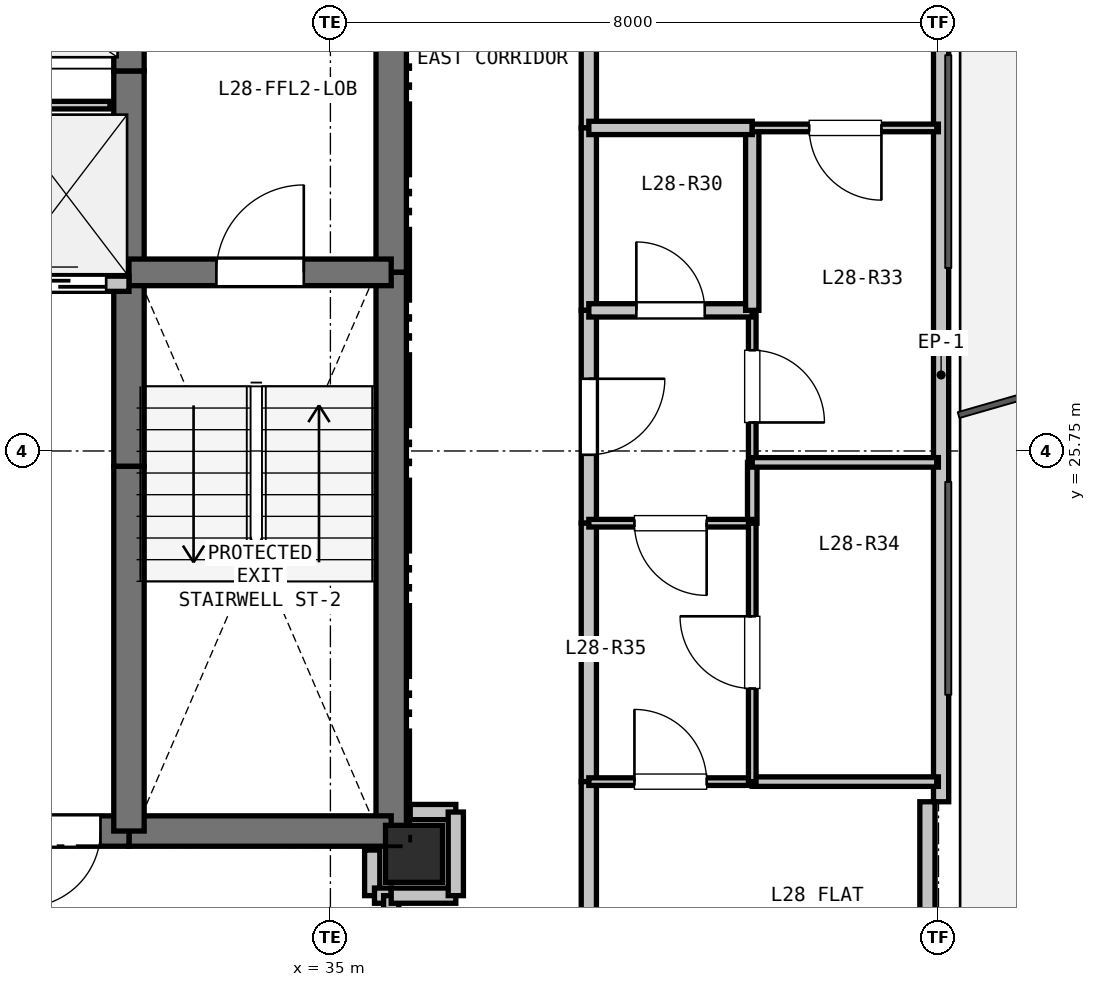
"""IFC4 building model, lengths in metres.
Left out: names, types, materials, properties, quantities, classifications, styles, units other than length and angle.
Written with IfcOpenShell. Run it as: python <this file> out.ifc"""

import sys

from ifc_helpers import new_model, si_unit, direction, frame, frame_2d, origin, origin_2d, place, context, subcontext, project, spatial, rectangle, extrude, element, fill, save


model = new_model("IFC4")
c1 = context("Model", 3, precision=1e-05, world=origin(), true_north=direction((0.0, 1.0)))
c2 = subcontext(c1, "Body", "Model", "MODEL_VIEW")
j1 = project(units=[si_unit("LENGTHUNIT", "METRE"), si_unit("PLANEANGLEUNIT", "RADIAN")], contexts=[c1])
p1 = place(None, origin())
s1 = spatial("IfcSite", under=j1, at=p1, CompositionType="ELEMENT")
p2 = place(p1, origin())
s2 = spatial("IfcBuilding", under=s1, at=p2, CompositionType="ELEMENT")
p3 = place(p2, frame((0.0, 0.0, 103.2)))
s3 = spatial("IfcBuildingStorey", under=s2, at=p3, CompositionType="ELEMENT", Elevation=103.2)
p4 = place(p3, frame((36.1, 20.45, 0.0), z_axis=(0.0, 0.0, 1.0), x_axis=(1.0, 0.0, 0.0)))
e1 = element("IfcColumn", 1, at=p4, inside=s3, PredefinedType="COLUMN", context=c2, shape_type="SweptSolid", body=[
    extrude(rectangle(XDim=0.75, YDim=0.75, at=origin_2d()), origin(), (0.0, 0.0, 1.0), 3.3),
])
p5 = place(p3, frame((43.035, 32.365, 0.0), z_axis=(0.0, 0.0, 1.0), x_axis=(0.0, -1.0, 0.0)))
e2 = element("IfcWall", 2, at=p5, inside=s3, PredefinedType="PARAPET", context=c2, shape_type="SweptSolid", body=[
    extrude(rectangle(XDim=11.229, YDim=0.2, at=frame_2d((5.615, 0.0))), origin(), (0.0, 0.0, 1.0), 0.2),
])
p6 = place(p3, frame((42.854, 21.135, 0.0), z_axis=(0.0, 0.0, 1.0), x_axis=(0.0, -1.0, 0.0)))
e3 = element("IfcWall", 3, at=p6, inside=s3, PredefinedType="PARAPET", context=c2, shape_type="SweptSolid", body=[
    extrude(rectangle(XDim=1.7, YDim=0.2, at=frame_2d((0.85, 0.0))), origin(), (0.0, 0.0, 1.0), 2.67),
])
p7 = place(p3, frame((35.8, 32.75, 0.0), z_axis=(0.0, 0.0, 1.0), x_axis=(0.0, -1.0, 0.0)))
e4 = element("IfcWall", 4, at=p7, inside=s3, PredefinedType="SHEAR", context=c2, shape_type="SweptSolid", body=[
    extrude(rectangle(XDim=4.65, YDim=0.4, at=frame_2d((2.325, 0.0))), origin(), (0.0, 0.0, 1.0), 3.05),
])
p8 = place(p3, frame((35.8, 28.1, 0.0), z_axis=(0.0, 0.0, 1.0), x_axis=(0.0, -1.0, 0.0)))
e5 = element("IfcWall", 5, at=p8, inside=s3, PredefinedType="SHEAR", context=c2, shape_type="SweptSolid", body=[
    extrude(rectangle(XDim=7.35, YDim=0.4, at=frame_2d((3.675, 0.0))), origin(), (0.0, 0.0, 1.0), 3.05),
])
p9 = place(p3, frame((35.8, 20.75, 0.0), z_axis=(0.0, 0.0, 1.0), x_axis=(-1.0, 0.0, 0.0)))
e6 = element("IfcWall", 6, at=p9, inside=s3, PredefinedType="SHEAR", context=c2, shape_type="SweptSolid", body=[
    extrude(rectangle(XDim=3.45, YDim=0.4, at=frame_2d((1.725, 0.0))), origin(), (0.0, 0.0, 1.0), 3.05),
])
p10 = place(p3, frame((32.35, 20.75, 0.0), z_axis=(0.0, 0.0, 1.0), x_axis=(-1.0, 0.0, 0.0)))
e7 = element("IfcWall", 7, at=p10, inside=s3, PredefinedType="SHEAR", context=c2, shape_type="SweptSolid", body=[
    extrude(rectangle(XDim=1.75, YDim=0.4, at=frame_2d((0.875, 0.0))), origin(), (0.0, 0.0, 1.0), 3.05),
])
p11 = place(p10, frame((0.375, 0.0, 0.0)))
e8 = element("IfcOpeningElement", 8, at=p11, cuts=e7, PredefinedType="OPENING", context=c2, shape_type="SweptSolid", body=[
    extrude(rectangle(XDim=1.0, YDim=2.15, at=frame_2d((0.5, 1.075))), frame((0.0, 0.21, 0.0), z_axis=(0.0, -1.0, 0.0), x_axis=(1.0, 0.0, 0.0)), (0.0, 0.0, 1.0), 0.42),
])
p12 = place(p3, frame((32.35, 20.75, 0.0), z_axis=(0.0, 0.0, 1.0), x_axis=(0.0, 1.0, 0.0)))
e9 = element("IfcWall", 9, at=p12, inside=s3, PredefinedType="SHEAR", context=c2, shape_type="SweptSolid", body=[
    extrude(rectangle(XDim=4.8, YDim=0.4, at=frame_2d((2.4, 0.0))), origin(), (0.0, 0.0, 1.0), 3.05),
])
p13 = place(p3, frame((32.35, 25.55, 0.0), z_axis=(0.0, 0.0, 1.0), x_axis=(0.0, 1.0, 0.0)))
e10 = element("IfcWall", 10, at=p13, inside=s3, PredefinedType="SHEAR", context=c2, shape_type="SweptSolid", body=[
    extrude(rectangle(XDim=2.4, YDim=0.4, at=frame_2d((1.2, 0.0))), origin(), (0.0, 0.0, 1.0), 3.05),
])
p14 = place(p3, frame((32.35, 27.95, 0.0), z_axis=(0.0, 0.0, 1.0), x_axis=(0.0, 1.0, 0.0)))
e11 = element("IfcWall", 11, at=p14, inside=s3, PredefinedType="SHEAR", context=c2, shape_type="SweptSolid", body=[
    extrude(rectangle(XDim=2.8, YDim=0.4, at=frame_2d((1.4, 0.0))), origin(), (0.0, 0.0, 1.0), 3.05),
])
p15 = place(p3, frame((32.35, 30.75, 0.0), z_axis=(0.0, 0.0, 1.0), x_axis=(0.0, 1.0, 0.0)))
e12 = element("IfcWall", 12, at=p15, inside=s3, PredefinedType="SHEAR", context=c2, shape_type="SweptSolid", body=[
    extrude(rectangle(XDim=2.0, YDim=0.4, at=frame_2d((1.0, 0.0))), origin(), (0.0, 0.0, 1.0), 3.05),
])
p16 = place(p15, frame((0.45, 0.0, 0.0)))
e13 = element("IfcOpeningElement", 13, at=p16, cuts=e12, PredefinedType="OPENING", context=c2, shape_type="SweptSolid", body=[
    extrude(rectangle(XDim=1.1, YDim=2.15, at=frame_2d((0.55, 1.075))), frame((0.0, 0.21, 0.0), z_axis=(0.0, -1.0, 0.0), x_axis=(1.0, 0.0, 0.0)), (0.0, 0.0, 1.0), 0.42),
])
p17 = place(p3, frame((32.35, 28.1, 0.0), z_axis=(0.0, 0.0, 1.0), x_axis=(1.0, 0.0, 0.0)))
e14 = element("IfcWall", 14, at=p17, inside=s3, PredefinedType="SHEAR", context=c2, shape_type="SweptSolid", body=[
    extrude(rectangle(XDim=3.45, YDim=0.35, at=frame_2d((1.725, 0.0))), origin(), (0.0, 0.0, 1.0), 3.05),
])
p18 = place(p17, frame((1.15, 0.0, 0.0)))
e15 = element("IfcOpeningElement", 15, at=p18, cuts=e14, PredefinedType="OPENING", context=c2, shape_type="SweptSolid", body=[
    extrude(rectangle(XDim=1.15, YDim=2.15, at=frame_2d((0.575, 1.075))), frame((0.0, 0.185, 0.0), z_axis=(0.0, -1.0, 0.0), x_axis=(1.0, 0.0, 0.0)), (0.0, 0.0, 1.0), 0.37),
])
p19 = place(p3, frame((27.4, 27.95, 0.0), z_axis=(0.0, 0.0, 1.0), x_axis=(1.0, 0.0, 0.0)))
e16 = element("IfcWall", 16, at=p19, inside=s3, PredefinedType="PARTITIONING", context=c2, shape_type="SweptSolid", body=[
    extrude(rectangle(XDim=4.95, YDim=0.2, at=frame_2d((2.475, 0.0))), origin(), (0.0, 0.0, 1.0), 3.05),
])
p20 = place(p19, frame((0.25, 0.0, 0.0)))
e17 = element("IfcOpeningElement", 17, at=p20, cuts=e16, PredefinedType="OPENING", context=c2, shape_type="SweptSolid", body=[
    extrude(rectangle(XDim=1.1, YDim=2.15, at=frame_2d((0.55, 1.075))), frame((0.0, 0.11, 0.0), z_axis=(0.0, -1.0, 0.0), x_axis=(1.0, 0.0, 0.0)), (0.0, 0.0, 1.0), 0.22),
])
p21 = place(p19, frame((1.9, 0.0, 0.0)))
e18 = element("IfcOpeningElement", 18, at=p21, cuts=e16, PredefinedType="OPENING", context=c2, shape_type="SweptSolid", body=[
    extrude(rectangle(XDim=1.1, YDim=2.15, at=frame_2d((0.55, 1.075))), frame((0.0, 0.11, 0.0), z_axis=(0.0, -1.0, 0.0), x_axis=(1.0, 0.0, 0.0)), (0.0, 0.0, 1.0), 0.22),
])
p22 = place(p19, frame((3.55, 0.0, 0.0)))
e19 = element("IfcOpeningElement", 19, at=p22, cuts=e16, PredefinedType="OPENING", context=c2, shape_type="SweptSolid", body=[
    extrude(rectangle(XDim=1.1, YDim=2.15, at=frame_2d((0.55, 1.075))), frame((0.0, 0.11, 0.0), z_axis=(0.0, -1.0, 0.0), x_axis=(1.0, 0.0, 0.0)), (0.0, 0.0, 1.0), 0.22),
])
p23 = place(p3, frame((32.1, 30.3, 0.0), z_axis=(0.0, 0.0, 1.0), x_axis=(-1.0, 0.0, 0.0)))
e20 = element("IfcWall", 20, at=p23, inside=s3, PredefinedType="PARTITIONING", context=c2, shape_type="SweptSolid", body=[
    extrude(rectangle(XDim=1.4, YDim=0.1, at=frame_2d((0.7, 0.0))), origin(), (0.0, 0.0, 1.0), 3.05),
])
p24 = place(p3, frame((35.55, 20.5, 0.0), z_axis=(0.0, 0.0, 1.0), x_axis=(0.0, -1.0, 0.0)))
e21 = element("IfcWall", 21, at=p24, inside=s3, PredefinedType="PARTITIONING", context=c2, shape_type="SweptSolid", body=[
    extrude(rectangle(XDim=0.6, YDim=0.2, at=frame_2d((0.3, 0.0))), origin(), (0.0, 0.0, 1.0), 2.498),
])
p25 = place(p3, frame((35.58, 19.9, 0.0), z_axis=(0.0, 0.0, 1.0), x_axis=(1.0, 0.0, 0.0)))
e22 = element("IfcWall", 22, at=p25, inside=s3, PredefinedType="PARTITIONING", context=c2, shape_type="SweptSolid", body=[
    extrude(rectangle(XDim=0.22, YDim=0.2, at=frame_2d((0.11, 0.0))), origin(), (0.0, 0.0, 1.0), 3.05),
])
p26 = place(p3, frame((35.8, 19.9, 0.0), z_axis=(0.0, 0.0, 1.0), x_axis=(0.0, -1.0, 0.0)))
e23 = element("IfcWall", 23, at=p26, inside=s3, PredefinedType="PARTITIONING", context=c2, shape_type="SweptSolid", body=[
    extrude(rectangle(XDim=1.75, YDim=0.2, at=frame_2d((0.875, 0.0))), origin(), (0.0, 0.0, 1.0), 3.05),
])
p27 = place(p26, frame((0.375, 0.0, 0.0)))
e24 = element("IfcOpeningElement", 24, at=p27, cuts=e23, PredefinedType="OPENING", context=c2, shape_type="SweptSolid", body=[
    extrude(rectangle(XDim=1.0, YDim=2.15, at=frame_2d((0.5, 1.075))), frame((0.0, 0.11, 0.0), z_axis=(0.0, -1.0, 0.0), x_axis=(1.0, 0.0, 0.0)), (0.0, 0.0, 1.0), 0.22),
])
p28 = place(p3, frame((36.65, 21.0, 0.0), z_axis=(0.0, 0.0, 1.0), x_axis=(-1.0, 0.0, 0.0)))
e25 = element("IfcWall", 25, at=p28, inside=s3, PredefinedType="PARTITIONING", context=c2, shape_type="SweptSolid", body=[
    extrude(rectangle(XDim=0.6, YDim=0.2, at=frame_2d((0.3, 0.0))), origin(), (0.0, 0.0, 1.0), 2.498),
])
p29 = place(p3, frame((38.4, 35.35, 0.0), z_axis=(0.0, 0.0, 1.0), x_axis=(0.0, -1.0, 0.0)))
e26 = element("IfcWall", 26, at=p29, inside=s3, PredefinedType="PARTITIONING", context=c2, shape_type="SweptSolid", body=[
    extrude(rectangle(XDim=5.35, YDim=0.2, at=frame_2d((2.675, 0.0))), origin(), (0.0, 0.0, 1.0), 3.05),
])
p30 = place(p3, frame((38.4, 30.0, 0.0), z_axis=(0.0, 0.0, 1.0), x_axis=(0.0, -1.0, 0.0)))
e27 = element("IfcWall", 27, at=p30, inside=s3, PredefinedType="PARTITIONING", context=c2, shape_type="SweptSolid", body=[
    extrude(rectangle(XDim=2.4, YDim=0.2, at=frame_2d((1.2, 0.0))), origin(), (0.0, 0.0, 1.0), 3.05),
])
p31 = place(p3, frame((38.4, 27.6, 0.0), z_axis=(0.0, 0.0, 1.0), x_axis=(0.0, -1.0, 0.0)))
e28 = element("IfcWall", 28, at=p31, inside=s3, PredefinedType="PARTITIONING", context=c2, shape_type="SweptSolid", body=[
    extrude(rectangle(XDim=2.8, YDim=0.2, at=frame_2d((1.4, 0.0))), origin(), (0.0, 0.0, 1.0), 3.05),
])
p32 = place(p31, frame((0.9, 0.0, 0.0)))
e29 = element("IfcOpeningElement", 29, at=p32, cuts=e28, PredefinedType="OPENING", context=c2, shape_type="SweptSolid", body=[
    extrude(rectangle(XDim=1.0, YDim=2.15, at=frame_2d((0.5, 1.075))), frame((0.0, 0.11, 0.0), z_axis=(0.0, -1.0, 0.0), x_axis=(1.0, 0.0, 0.0)), (0.0, 0.0, 1.0), 0.22),
])
p33 = place(p3, frame((38.4, 24.8, 0.0), z_axis=(0.0, 0.0, 1.0), x_axis=(0.0, -1.0, 0.0)))
e30 = element("IfcWall", 30, at=p33, inside=s3, PredefinedType="PARTITIONING", context=c2, shape_type="SweptSolid", body=[
    extrude(rectangle(XDim=3.4, YDim=0.2, at=frame_2d((1.7, 0.0))), origin(), (0.0, 0.0, 1.0), 3.05),
])
p34 = place(p3, frame((38.4, 21.4, 0.0), z_axis=(0.0, 0.0, 1.0), x_axis=(0.0, -1.0, 0.0)))
e31 = element("IfcWall", 31, at=p34, inside=s3, PredefinedType="PARTITIONING", context=c2, shape_type="SweptSolid", body=[
    extrude(rectangle(XDim=3.25, YDim=0.2, at=frame_2d((1.625, 0.0))), origin(), (0.0, 0.0, 1.0), 3.05),
])
p35 = place(p3, frame((35.8, 19.9, 0.0), z_axis=(0.0, 0.0, 1.0), x_axis=(1.0, 0.0, 0.0)))
e32 = element("IfcWall", 32, at=p35, inside=s3, PredefinedType="PARTITIONING", context=c2, shape_type="SweptSolid", body=[
    extrude(rectangle(XDim=0.85, YDim=0.2, at=frame_2d((0.425, 0.0))), origin(), (0.0, 0.0, 1.0), 2.423),
])
p36 = place(p3, frame((36.65, 19.9, 0.0), z_axis=(0.0, 0.0, 1.0), x_axis=(0.0, 1.0, 0.0)))
e33 = element("IfcWall", 33, at=p36, inside=s3, PredefinedType="PARTITIONING", context=c2, shape_type="SweptSolid", body=[
    extrude(rectangle(XDim=1.1, YDim=0.2, at=frame_2d((0.55, 0.0))), origin(), (0.0, 0.0, 1.0), 3.05),
])
p37 = place(p3, frame((40.55, 27.6, 0.0), z_axis=(0.0, 0.0, 1.0), x_axis=(0.0, -1.0, 0.0)))
e34 = element("IfcWall", 34, at=p37, inside=s3, PredefinedType="PARTITIONING", context=c2, shape_type="SweptSolid", body=[
    extrude(rectangle(XDim=2.0, YDim=0.1, at=frame_2d((1.0, 0.0))), origin(), (0.0, 0.0, 1.0), 3.05),
])
p38 = place(p37, frame((0.525, 0.0, 0.0)))
e35 = element("IfcOpeningElement", 35, at=p38, cuts=e34, PredefinedType="OPENING", context=c2, shape_type="SweptSolid", body=[
    extrude(rectangle(XDim=0.95, YDim=2.1, at=frame_2d((0.475, 1.05))), frame((0.0, 0.06, 0.0), z_axis=(0.0, -1.0, 0.0), x_axis=(1.0, 0.0, 0.0)), (0.0, 0.0, 1.0), 0.12),
])
p39 = place(p3, frame((40.55, 25.6, 0.0), z_axis=(0.0, 0.0, 1.0), x_axis=(0.0, -1.0, 0.0)))
e36 = element("IfcWall", 36, at=p39, inside=s3, PredefinedType="PARTITIONING", context=c2, shape_type="SweptSolid", body=[
    extrude(rectangle(XDim=0.8, YDim=0.125, at=frame_2d((0.4, 0.0))), origin(), (0.0, 0.0, 1.0), 3.05),
])
p40 = place(p3, frame((40.55, 24.8, 0.0), z_axis=(0.0, 0.0, 1.0), x_axis=(-1.0, 0.0, 0.0)))
e37 = element("IfcWall", 37, at=p40, inside=s3, PredefinedType="PARTITIONING", context=c2, shape_type="SweptSolid", body=[
    extrude(rectangle(XDim=2.15, YDim=0.1, at=frame_2d((1.075, 0.0))), origin(), (0.0, 0.0, 1.0), 3.05),
])
p41 = place(p40, frame((0.6, 0.0, 0.0)))
e38 = element("IfcOpeningElement", 38, at=p41, cuts=e37, PredefinedType="OPENING", context=c2, shape_type="SweptSolid", body=[
    extrude(rectangle(XDim=0.95, YDim=2.1, at=frame_2d((0.475, 1.05))), frame((0.0, 0.06, 0.0), z_axis=(0.0, -1.0, 0.0), x_axis=(1.0, 0.0, 0.0)), (0.0, 0.0, 1.0), 0.12),
])
p42 = place(p3, frame((38.4, 27.6, 0.0), z_axis=(0.0, 0.0, 1.0), x_axis=(1.0, 0.0, 0.0)))
e39 = element("IfcWall", 39, at=p42, inside=s3, PredefinedType="PLUMBINGWALL", context=c2, shape_type="SweptSolid", body=[
    extrude(rectangle(XDim=2.15, YDim=0.175, at=frame_2d((1.075, 0.0))), origin(), (0.0, 0.0, 1.0), 3.05),
])
p43 = place(p42, frame((0.625, 0.0, 0.0)))
e40 = element("IfcOpeningElement", 40, at=p43, cuts=e39, PredefinedType="OPENING", context=c2, shape_type="SweptSolid", body=[
    extrude(rectangle(XDim=0.9, YDim=2.1, at=frame_2d((0.45, 1.05))), frame((0.0, 0.097, 0.0), z_axis=(0.0, -1.0, 0.0), x_axis=(1.0, 0.0, 0.0)), (0.0, 0.0, 1.0), 0.195),
])
p44 = place(p3, frame((40.55, 30.0, 0.0), z_axis=(0.0, 0.0, 1.0), x_axis=(0.0, -1.0, 0.0)))
e41 = element("IfcWall", 41, at=p44, inside=s3, PredefinedType="PLUMBINGWALL", context=c2, shape_type="SweptSolid", body=[
    extrude(rectangle(XDim=2.4, YDim=0.175, at=frame_2d((1.2, 0.0))), origin(), (0.0, 0.0, 1.0), 3.05),
])
p45 = place(p3, frame((38.4, 30.0, 0.0), z_axis=(0.0, 0.0, 1.0), x_axis=(1.0, 0.0, 0.0)))
e42 = element("IfcWall", 42, at=p45, inside=s3, PredefinedType="PLUMBINGWALL", context=c2, shape_type="SweptSolid", body=[
    extrude(rectangle(XDim=2.15, YDim=0.175, at=frame_2d((1.075, 0.0))), origin(), (0.0, 0.0, 1.0), 3.05),
])
p46 = place(p3, frame((38.4, 21.4, 0.0), z_axis=(0.0, 0.0, 1.0), x_axis=(1.0, 0.0, 0.0)))
e43 = element("IfcWall", 43, at=p46, inside=s3, PredefinedType="PARTITIONING", context=c2, shape_type="SweptSolid", body=[
    extrude(rectangle(XDim=2.15, YDim=0.1, at=frame_2d((1.075, 0.0))), origin(), (0.0, 0.0, 1.0), 3.05),
])
p47 = place(p46, frame((0.6, 0.0, 0.0)))
e44 = element("IfcOpeningElement", 44, at=p47, cuts=e43, PredefinedType="OPENING", context=c2, shape_type="SweptSolid", body=[
    extrude(rectangle(XDim=0.95, YDim=2.1, at=frame_2d((0.475, 1.05))), frame((0.0, 0.06, 0.0), z_axis=(0.0, -1.0, 0.0), x_axis=(1.0, 0.0, 0.0)), (0.0, 0.0, 1.0), 0.12),
])
p48 = place(p3, frame((40.55, 21.4, 0.0), z_axis=(0.0, 0.0, 1.0), x_axis=(1.0, 0.0, 0.0)))
e45 = element("IfcWall", 45, at=p48, inside=s3, PredefinedType="PARTITIONING", context=c2, shape_type="SweptSolid", body=[
    extrude(rectangle(XDim=2.448, YDim=0.125, at=frame_2d((1.224, 0.0))), origin(), (0.0, 0.0, 1.0), 2.365),
])
p49 = place(p3, frame((42.999, 30.0, 0.0), z_axis=(0.0, 0.0, 1.0), x_axis=(-1.0, 0.0, 0.0)))
e46 = element("IfcWall", 46, at=p49, inside=s3, PredefinedType="PARTITIONING", context=c2, shape_type="SweptSolid", body=[
    extrude(rectangle(XDim=2.448, YDim=0.1, at=frame_2d((1.224, 0.0))), origin(), (0.0, 0.0, 1.0), 2.365),
])
p50 = place(p49, frame((0.749, 0.0, 0.0)))
e47 = element("IfcOpeningElement", 47, at=p50, cuts=e46, PredefinedType="OPENING", context=c2, shape_type="SweptSolid", body=[
    extrude(rectangle(XDim=0.95, YDim=2.1, at=frame_2d((0.475, 1.05))), frame((0.0, 0.06, 0.0), z_axis=(0.0, -1.0, 0.0), x_axis=(1.0, 0.0, 0.0)), (0.0, 0.0, 1.0), 0.12),
])
p51 = place(p3, frame((42.999, 25.6, 0.0), z_axis=(0.0, 0.0, 1.0), x_axis=(-1.0, 0.0, 0.0)))
e48 = element("IfcWall", 48, at=p51, inside=s3, PredefinedType="PARTITIONING", context=c2, shape_type="SweptSolid", body=[
    extrude(rectangle(XDim=2.448, YDim=0.125, at=frame_2d((1.224, 0.0))), origin(), (0.0, 0.0, 1.0), 2.365),
])
p52 = place(p3, frame((40.55, 21.4, 0.0), z_axis=(0.0, 0.0, 1.0), x_axis=(0.0, 1.0, 0.0)))
e49 = element("IfcWall", 49, at=p52, inside=s3, PredefinedType="PARTITIONING", context=c2, shape_type="SweptSolid", body=[
    extrude(rectangle(XDim=3.4, YDim=0.1, at=frame_2d((1.7, 0.0))), origin(), (0.0, 0.0, 1.0), 3.05),
])
p53 = place(p52, frame((1.225, 0.0, 0.0)))
e50 = element("IfcOpeningElement", 50, at=p53, cuts=e49, PredefinedType="OPENING", context=c2, shape_type="SweptSolid", body=[
    extrude(rectangle(XDim=0.95, YDim=2.1, at=frame_2d((0.475, 1.05))), frame((0.0, 0.06, 0.0), z_axis=(0.0, -1.0, 0.0), x_axis=(1.0, 0.0, 0.0)), (0.0, 0.0, 1.0), 0.12),
])
p54 = place(p22, origin())
e51 = element("IfcDoor", 51, at=p54, inside=s3, OperationType="SLIDING_TO_LEFT", PredefinedType="DOOR", context=c2, shape_type="SweptSolid", body=[
    extrude(rectangle(XDim=1.1, YDim=2.15, at=frame_2d((0.55, 1.075))), frame((0.0, 0.025, 0.0), z_axis=(0.0, -1.0, 0.0), x_axis=(1.0, 0.0, 0.0)), (0.0, 0.0, 1.0), 0.05),
])
fill(e19, e51)
p55 = place(p11, origin())
e52 = element("IfcDoor", 52, at=p55, inside=s3, OperationType="SINGLE_SWING_RIGHT", PredefinedType="DOOR", context=c2, shape_type="SweptSolid", body=[
    extrude(rectangle(XDim=1.0, YDim=2.15, at=frame_2d((0.5, 1.075))), frame((0.0, 0.025, 0.0), z_axis=(0.0, -1.0, 0.0), x_axis=(1.0, 0.0, 0.0)), (0.0, 0.0, 1.0), 0.05),
])
fill(e8, e52)
p56 = place(p18, origin())
e53 = element("IfcDoor", 53, at=p56, inside=s3, OperationType="SINGLE_SWING_RIGHT", PredefinedType="DOOR", context=c2, shape_type="SweptSolid", body=[
    extrude(rectangle(XDim=1.15, YDim=2.15, at=frame_2d((0.575, 1.075))), frame((0.0, 0.025, 0.0), z_axis=(0.0, -1.0, 0.0), x_axis=(1.0, 0.0, 0.0)), (0.0, 0.0, 1.0), 0.05),
])
fill(e15, e53)
p57 = place(p32, origin())
e54 = element("IfcDoor", 54, at=p57, inside=s3, OperationType="SINGLE_SWING_LEFT", PredefinedType="DOOR", context=c2, shape_type="SweptSolid", body=[
    extrude(rectangle(XDim=1.0, YDim=2.15, at=frame_2d((0.5, 1.075))), frame((0.0, 0.025, 0.0), z_axis=(0.0, -1.0, 0.0), x_axis=(1.0, 0.0, 0.0)), (0.0, 0.0, 1.0), 0.05),
])
fill(e29, e54)
p58 = place(p43, origin())
e55 = element("IfcDoor", 55, at=p58, inside=s3, OperationType="SINGLE_SWING_LEFT", PredefinedType="DOOR", context=c2, shape_type="SweptSolid", body=[
    extrude(rectangle(XDim=0.9, YDim=2.1, at=frame_2d((0.45, 1.05))), frame((0.0, 0.025, 0.0), z_axis=(0.0, -1.0, 0.0), x_axis=(1.0, 0.0, 0.0)), (0.0, 0.0, 1.0), 0.05),
])
fill(e40, e55)
p59 = place(p38, origin())
e56 = element("IfcDoor", 56, at=p59, inside=s3, OperationType="SINGLE_SWING_RIGHT", PredefinedType="DOOR", context=c2, shape_type="SweptSolid", body=[
    extrude(rectangle(XDim=0.95, YDim=2.1, at=frame_2d((0.475, 1.05))), frame((0.0, 0.025, 0.0), z_axis=(0.0, -1.0, 0.0), x_axis=(1.0, 0.0, 0.0)), (0.0, 0.0, 1.0), 0.05),
])
fill(e35, e56)
p60 = place(p41, origin())
e57 = element("IfcDoor", 57, at=p60, inside=s3, OperationType="SINGLE_SWING_LEFT", PredefinedType="DOOR", context=c2, shape_type="SweptSolid", body=[
    extrude(rectangle(XDim=0.95, YDim=2.1, at=frame_2d((0.475, 1.05))), frame((0.0, 0.025, 0.0), z_axis=(0.0, -1.0, 0.0), x_axis=(1.0, 0.0, 0.0)), (0.0, 0.0, 1.0), 0.05),
])
fill(e38, e57)
p61 = place(p47, origin())
e58 = element("IfcDoor", 58, at=p61, inside=s3, OperationType="SINGLE_SWING_LEFT", PredefinedType="DOOR", context=c2, shape_type="SweptSolid", body=[
    extrude(rectangle(XDim=0.95, YDim=2.1, at=frame_2d((0.475, 1.05))), frame((0.0, 0.025, 0.0), z_axis=(0.0, -1.0, 0.0), x_axis=(1.0, 0.0, 0.0)), (0.0, 0.0, 1.0), 0.05),
])
fill(e44, e58)
p62 = place(p50, origin())
e59 = element("IfcDoor", 59, at=p62, inside=s3, OperationType="SINGLE_SWING_LEFT", PredefinedType="DOOR", context=c2, shape_type="SweptSolid", body=[
    extrude(rectangle(XDim=0.95, YDim=2.1, at=frame_2d((0.475, 1.05))), frame((0.0, 0.025, 0.0), z_axis=(0.0, -1.0, 0.0), x_axis=(1.0, 0.0, 0.0)), (0.0, 0.0, 1.0), 0.05),
])
fill(e47, e59)
p63 = place(p53, origin())
e60 = element("IfcDoor", 60, at=p63, inside=s3, OperationType="SINGLE_SWING_RIGHT", PredefinedType="DOOR", context=c2, shape_type="SweptSolid", body=[
    extrude(rectangle(XDim=0.95, YDim=2.1, at=frame_2d((0.475, 1.05))), frame((0.0, 0.025, 0.0), z_axis=(0.0, -1.0, 0.0), x_axis=(1.0, 0.0, 0.0)), (0.0, 0.0, 1.0), 0.05),
])
fill(e50, e60)
save(model, sys.argv[1])
